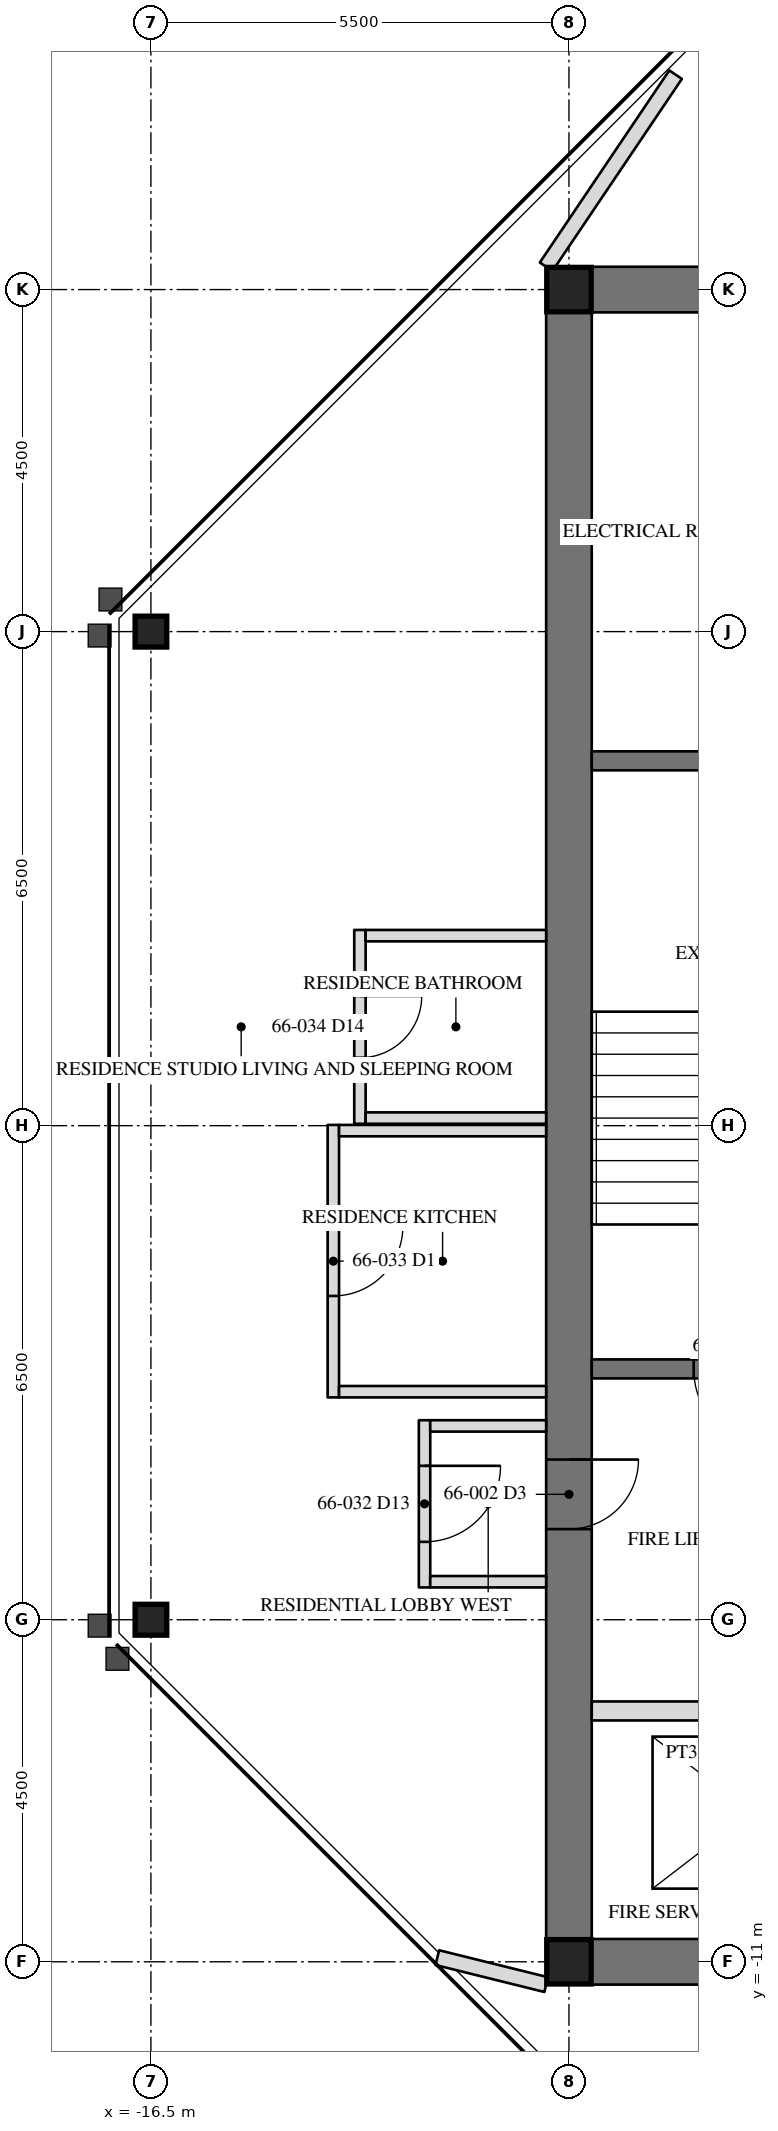
"""IFC4 building model, lengths in metres.
Left out: names, types, materials, properties, quantities, classifications, styles, units other than length and angle.
Written with IfcOpenShell. Run it as: python <this file> out.ifc"""

import sys

from ifc_helpers import new_model, si_unit, direction, frame, frame_2d, origin, origin_2d, place, context, subcontext, project, spatial, rectangle, hollow_rectangle, i_section, extrude, element, fill, save


model = new_model("IFC4")
c1 = context("Model", 3, precision=1e-05, world=origin(), true_north=direction((0.0, 1.0)))
c2 = subcontext(c1, "Body", "Model", "MODEL_VIEW")
j1 = project(units=[si_unit("LENGTHUNIT", "METRE"), si_unit("PLANEANGLEUNIT", "RADIAN")], contexts=[c1])
p1 = place(None, origin())
s1 = spatial("IfcSite", under=j1, at=p1, CompositionType="ELEMENT")
p2 = place(p1, origin())
s2 = spatial("IfcBuilding", under=s1, at=p2, CompositionType="ELEMENT")
p3 = place(p2, frame((0.0, 0.0, 270.4)))
s3 = spatial("IfcBuildingStorey", under=s2, at=p3, CompositionType="ELEMENT", Elevation=270.4)
for number, where, z_axis, x_axis in (
    (1, (-16.5, -6.5, 0.0), (0.0, 0.0, 1.0), (0.0, 1.0, 0.0)),
    (2, (-16.5, 6.5, 0.0), (0.0, 0.0, 1.0), (0.0, 1.0, 0.0)),
):
    element("IfcColumn", number, at=place(p3, frame(where, z_axis=z_axis, x_axis=x_axis)), inside=s3, PredefinedType="COLUMN", context=c2, shape_type="SweptSolid", body=[
        extrude(i_section(OverallWidth=0.406, OverallDepth=0.417, WebThickness=0.03, FlangeThickness=0.048, at=origin_2d()), origin(), (0.0, 0.0, 1.0), 3.6),
    ])
p4 = place(p3, frame((-11.0, 11.0, 0.0), z_axis=(0.0, 0.0, 1.0), x_axis=(0.0, -1.0, 0.0)))
e3 = element("IfcWall", 3, at=p4, inside=s3, PredefinedType="SHEAR", context=c2, shape_type="SweptSolid", body=[
    extrude(rectangle(XDim=22.0, YDim=0.6, at=frame_2d((11.0, 0.0))), origin(), (0.0, 0.0, 1.0), 3.6),
])
p5 = place(p4, frame((15.393, 0.0, 0.0)))
e4 = element("IfcOpeningElement", 4, at=p5, cuts=e3, PredefinedType="OPENING", context=c2, shape_type="SweptSolid", body=[
    extrude(rectangle(XDim=0.915, YDim=2.134, at=frame_2d((0.458, 1.067))), frame((0.0, 0.31, 0.0), z_axis=(0.0, -1.0, 0.0), x_axis=(1.0, 0.0, 0.0)), (0.0, 0.0, 1.0), 0.62),
])
for number, where, z_axis, x_axis in (
    (5, (-6.5, 11.0, 0.0), (0.0, 0.0, 1.0), (-1.0, 0.0, 0.0)),
    (6, (-11.0, -11.0, 0.0), (0.0, 0.0, 1.0), (1.0, 0.0, 0.0)),
):
    element("IfcWall", number, at=place(p3, frame(where, z_axis=z_axis, x_axis=x_axis)), inside=s3, PredefinedType="SHEAR", context=c2, shape_type="SweptSolid", body=[
        extrude(rectangle(XDim=4.5, YDim=0.6, at=frame_2d((2.25, 0.0))), origin(), (0.0, 0.0, 1.0), 3.6),
    ])
for number, where, z_axis, x_axis in (
    (7, (-11.0, 11.0, 0.0), (0.0, 0.0, 1.0), (1.0, 0.0, 0.0)),
    (8, (-11.0, -11.0, 0.0), (0.0, 0.0, 1.0), (1.0, 0.0, 0.0)),
):
    element("IfcColumn", number, at=place(p3, frame(where, z_axis=z_axis, x_axis=x_axis)), inside=s3, PredefinedType="COLUMN", context=c2, shape_type="SweptSolid", body=[
        extrude(hollow_rectangle(XDim=0.584, YDim=0.584, WallThickness=0.051, at=origin_2d()), origin(), (0.0, 0.0, 1.0), 3.6),
    ])
p6 = place(p3, frame((-6.95, 4.8, 0.0), z_axis=(0.0, 0.0, 1.0), x_axis=(-1.0, 0.0, 0.0)))
e9 = element("IfcWall", 9, at=p6, inside=s3, PredefinedType="SOLIDWALL", context=c2, shape_type="SweptSolid", body=[
    extrude(rectangle(XDim=3.75, YDim=0.25, at=frame_2d((1.875, 0.0))), origin(), (0.0, 0.0, 1.0), 3.41),
])
p7 = place(p3, frame((-6.95, -3.2, 0.0), z_axis=(0.0, 0.0, 1.0), x_axis=(-1.0, 0.0, 0.0)))
e10 = element("IfcWall", 10, at=p7, inside=s3, PredefinedType="SOLIDWALL", context=c2, shape_type="SweptSolid", body=[
    extrude(rectangle(XDim=3.75, YDim=0.25, at=frame_2d((1.875, 0.0))), origin(), (0.0, 0.0, 1.0), 3.41),
])
p8 = place(p7, frame((1.342, 0.0, 0.0)))
e11 = element("IfcOpeningElement", 11, at=p8, cuts=e10, PredefinedType="OPENING", context=c2, shape_type="SweptSolid", body=[
    extrude(rectangle(XDim=1.067, YDim=2.134, at=frame_2d((0.533, 1.067))), frame((0.0, 0.135, 0.0), z_axis=(0.0, -1.0, 0.0), x_axis=(1.0, 0.0, 0.0)), (0.0, 0.0, 1.0), 0.27),
])
p9 = place(p3, frame((-6.95, -7.7, 0.0), z_axis=(0.0, 0.0, 1.0), x_axis=(-1.0, 0.0, 0.0)))
e12 = element("IfcWall", 12, at=p9, inside=s3, PredefinedType="PARTITIONING", context=c2, shape_type="SweptSolid", body=[
    extrude(rectangle(XDim=3.75, YDim=0.25, at=frame_2d((1.875, 0.0))), origin(), (0.0, 0.0, 1.0), 3.41),
])
p10 = place(p9, frame((0.45, 0.0, 0.0)))
e13 = element("IfcOpeningElement", 13, at=p10, cuts=e12, PredefinedType="OPENING", context=c2, shape_type="SweptSolid", body=[
    extrude(rectangle(XDim=1.219, YDim=2.134, at=frame_2d((0.609, 1.067))), frame((0.0, 0.135, 0.0), z_axis=(0.0, -1.0, 0.0), x_axis=(1.0, 0.0, 0.0)), (0.0, 0.0, 1.0), 0.27),
])
p11 = place(p3, frame((-11.3, 11.3, 0.0), z_axis=(0.0, 0.0, 1.0), x_axis=(0.558834300538, 0.829279340477, 0.0)))
e14 = element("IfcWall", 14, at=p11, inside=s3, PredefinedType="PARTITIONING", context=c2, shape_type="SweptSolid", body=[
    extrude(rectangle(XDim=3.048, YDim=0.2, at=frame_2d((1.524, 0.0))), origin(), (0.0, 0.0, 1.0), 2.704),
])
p12 = place(p3, frame((-11.3, -11.3, 0.0), z_axis=(0.0, 0.0, 1.0), x_axis=(-0.970646702169, 0.24050983258, 0.0)))
e15 = element("IfcWall", 15, at=p12, inside=s3, PredefinedType="PARTITIONING", context=c2, shape_type="SweptSolid", body=[
    extrude(rectangle(XDim=1.475, YDim=0.2, at=frame_2d((0.737, 0.0))), origin(), (0.0, 0.0, 1.0), 3.41),
])
p13 = place(p3, frame((-12.9, -3.875, 0.0), z_axis=(0.0, 0.0, 1.0), x_axis=(0.0, -1.0, 0.0)))
e16 = element("IfcWall", 16, at=p13, inside=s3, PredefinedType="PARTITIONING", context=c2, shape_type="SweptSolid", body=[
    extrude(rectangle(XDim=2.2, YDim=0.15, at=frame_2d((1.1, 0.0))), origin(), (0.0, 0.0, 1.0), 3.41),
])
p14 = place(p13, frame((0.6, 0.0, 0.0)))
e17 = element("IfcOpeningElement", 17, at=p14, cuts=e16, PredefinedType="OPENING", context=c2, shape_type="SweptSolid", body=[
    extrude(rectangle(XDim=1.0, YDim=2.134, at=frame_2d((0.5, 1.067))), frame((0.0, 0.085, 0.0), z_axis=(0.0, -1.0, 0.0), x_axis=(1.0, 0.0, 0.0)), (0.0, 0.0, 1.0), 0.17),
])
for number, where, z_axis, x_axis in (
    (18, (-11.3, -3.95, 0.0), (0.0, 0.0, 1.0), (-1.0, 0.0, 0.0)),
    (19, (-11.3, -6.0, 0.0), (0.0, 0.0, 1.0), (-1.0, 0.0, 0.0)),
):
    element("IfcWall", number, at=place(p3, frame(where, z_axis=z_axis, x_axis=x_axis)), inside=s3, PredefinedType="PARTITIONING", context=c2, shape_type="SweptSolid", body=[
        extrude(rectangle(XDim=1.525, YDim=0.15, at=frame_2d((0.762, 0.0))), origin(), (0.0, 0.0, 1.0), 3.41),
    ])
p15 = place(p3, frame((-14.1, 0.01, 0.0), z_axis=(0.0, 0.0, 1.0), x_axis=(0.0, -1.0, 0.0)))
e20 = element("IfcWall", 20, at=p15, inside=s3, PredefinedType="PARTITIONING", context=c2, shape_type="SweptSolid", body=[
    extrude(rectangle(XDim=3.585, YDim=0.15, at=frame_2d((1.792, 0.0))), origin(), (0.0, 0.0, 1.0), 3.41),
])
p16 = place(p15, frame((1.335, 0.0, 0.0)))
e21 = element("IfcOpeningElement", 21, at=p16, cuts=e20, PredefinedType="OPENING", context=c2, shape_type="SweptSolid", body=[
    extrude(rectangle(XDim=0.915, YDim=2.134, at=frame_2d((0.458, 1.067))), frame((0.0, 0.085, 0.0), z_axis=(0.0, -1.0, 0.0), x_axis=(1.0, 0.0, 0.0)), (0.0, 0.0, 1.0), 0.17),
])
p17 = place(p3, frame((-11.3, -0.065, 0.0), z_axis=(0.0, 0.0, 1.0), x_axis=(-1.0, 0.0, 0.0)))
e22 = element("IfcWall", 22, at=p17, inside=s3, PredefinedType="PARTITIONING", context=c2, shape_type="SweptSolid", body=[
    extrude(rectangle(XDim=2.725, YDim=0.15, at=frame_2d((1.362, 0.0))), origin(), (0.0, 0.0, 1.0), 2.709),
])
p18 = place(p3, frame((-11.3, -3.5, 0.0), z_axis=(0.0, 0.0, 1.0), x_axis=(-1.0, 0.0, 0.0)))
e23 = element("IfcWall", 23, at=p18, inside=s3, PredefinedType="PARTITIONING", context=c2, shape_type="SweptSolid", body=[
    extrude(rectangle(XDim=2.725, YDim=0.15, at=frame_2d((1.362, 0.0))), origin(), (0.0, 0.0, 1.0), 3.41),
])
p19 = place(p3, frame((-13.75, 2.575, 0.0), z_axis=(0.0, 0.0, 1.0), x_axis=(0.0, -1.0, 0.0)))
e24 = element("IfcWall", 24, at=p19, inside=s3, PredefinedType="PARTITIONING", context=c2, shape_type="SweptSolid", body=[
    extrude(rectangle(XDim=2.55, YDim=0.15, at=frame_2d((1.275, 0.0))), origin(), (0.0, 0.0, 1.0), 3.41),
])
p20 = place(p19, frame((0.868, 0.0, 0.0)))
e25 = element("IfcOpeningElement", 25, at=p20, cuts=e24, PredefinedType="OPENING", context=c2, shape_type="SweptSolid", body=[
    extrude(rectangle(XDim=0.813, YDim=2.032, at=frame_2d((0.406, 1.016))), frame((0.0, 0.085, 0.0), z_axis=(0.0, -1.0, 0.0), x_axis=(1.0, 0.0, 0.0)), (0.0, 0.0, 1.0), 0.17),
])
p21 = place(p3, frame((-11.3, 2.5, 0.0), z_axis=(0.0, 0.0, 1.0), x_axis=(-1.0, 0.0, 0.0)))
e26 = element("IfcWall", 26, at=p21, inside=s3, PredefinedType="PARTITIONING", context=c2, shape_type="SweptSolid", body=[
    extrude(rectangle(XDim=2.375, YDim=0.15, at=frame_2d((1.188, 0.0))), origin(), (0.0, 0.0, 1.0), 3.41),
])
p22 = place(p3, frame((-11.3, 0.1, 0.0), z_axis=(0.0, 0.0, 1.0), x_axis=(-1.0, 0.0, 0.0)))
e27 = element("IfcWall", 27, at=p22, inside=s3, PredefinedType="PARTITIONING", context=c2, shape_type="SweptSolid", body=[
    extrude(rectangle(XDim=2.375, YDim=0.15, at=frame_2d((1.188, 0.0))), origin(), (0.0, 0.0, 1.0), 2.709),
])
p23 = place(p5, origin())
e28 = element("IfcDoor", 28, at=p23, inside=s3, OperationType="SINGLE_SWING_RIGHT", PredefinedType="DOOR", context=c2, shape_type="SweptSolid", body=[
    extrude(rectangle(XDim=0.915, YDim=2.134, at=frame_2d((0.458, 1.067))), frame((0.0, -0.225, 0.0), z_axis=(0.0, -1.0, 0.0), x_axis=(1.0, 0.0, 0.0)), (0.0, 0.0, 1.0), 0.05),
])
fill(e4, e28)
p24 = place(p8, origin())
e29 = element("IfcDoor", 29, at=p24, inside=s3, OperationType="SINGLE_SWING_LEFT", PredefinedType="DOOR", context=c2, shape_type="SweptSolid", body=[
    extrude(rectangle(XDim=1.067, YDim=2.134, at=frame_2d((0.533, 1.067))), frame((0.0, 0.025, 0.0), z_axis=(0.0, -1.0, 0.0), x_axis=(1.0, 0.0, 0.0)), (0.0, 0.0, 1.0), 0.05),
])
fill(e11, e29)
p25 = place(p14, origin())
e30 = element("IfcDoor", 30, at=p25, inside=s3, OperationType="SINGLE_SWING_RIGHT", PredefinedType="DOOR", context=c2, shape_type="SweptSolid", body=[
    extrude(rectangle(XDim=1.0, YDim=2.134, at=frame_2d((0.5, 1.067))), frame((0.0, 0.025, 0.0), z_axis=(0.0, -1.0, 0.0), x_axis=(1.0, 0.0, 0.0)), (0.0, 0.0, 1.0), 0.05),
])
fill(e17, e30)
p26 = place(p16, origin())
e31 = element("IfcDoor", 31, at=p26, inside=s3, OperationType="SINGLE_SWING_LEFT", PredefinedType="DOOR", context=c2, shape_type="SweptSolid", body=[
    extrude(rectangle(XDim=0.915, YDim=2.134, at=frame_2d((0.458, 1.067))), frame((0.0, 0.025, 0.0), z_axis=(0.0, -1.0, 0.0), x_axis=(1.0, 0.0, 0.0)), (0.0, 0.0, 1.0), 0.05),
])
fill(e21, e31)
p27 = place(p20, origin())
e32 = element("IfcDoor", 32, at=p27, inside=s3, OperationType="SINGLE_SWING_LEFT", PredefinedType="DOOR", context=c2, shape_type="SweptSolid", body=[
    extrude(rectangle(XDim=0.813, YDim=2.032, at=frame_2d((0.406, 1.016))), frame((0.0, 0.025, 0.0), z_axis=(0.0, -1.0, 0.0), x_axis=(1.0, 0.0, 0.0)), (0.0, 0.0, 1.0), 0.05),
])
fill(e25, e32)
save(model, sys.argv[1])
